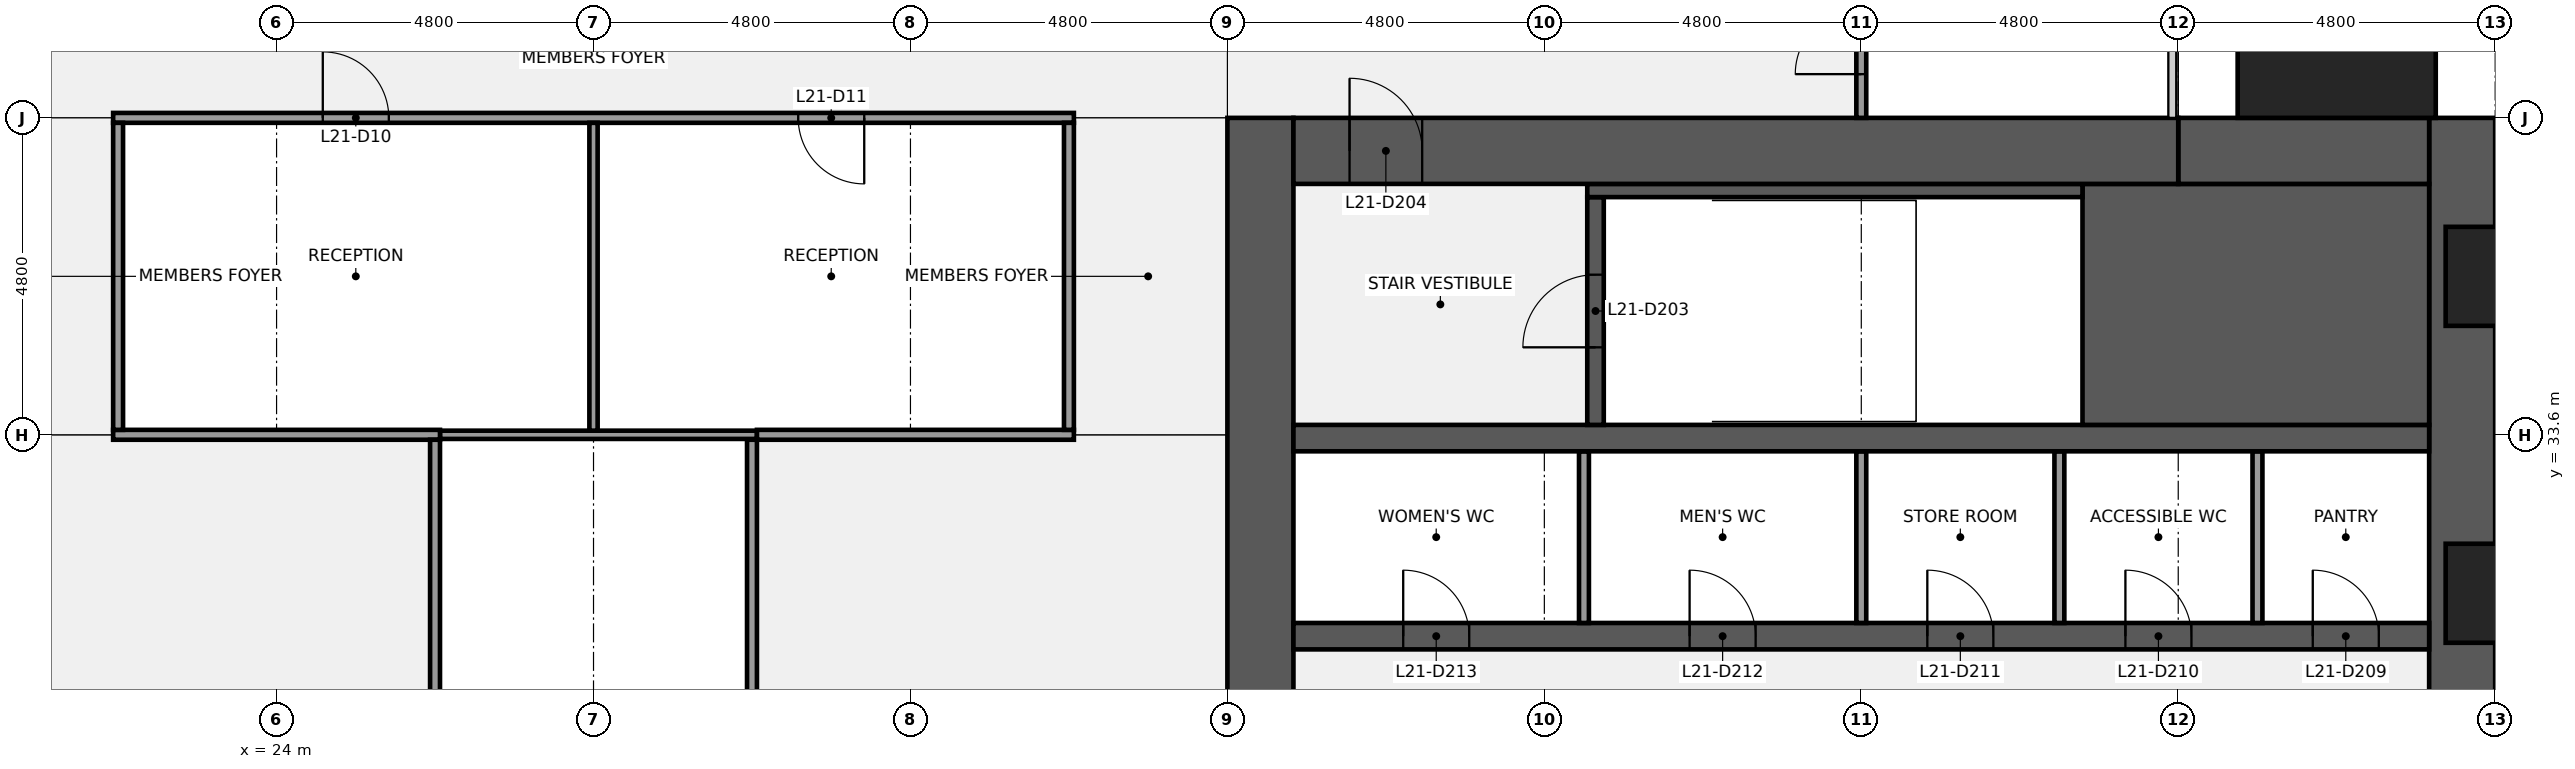
"""IFC4 building model, lengths in metres.
Left out: names, types, materials, properties, quantities, classifications, styles, units other than length and angle.
Written with IfcOpenShell. Run it as: python <this file> out.ifc"""

import sys

from ifc_helpers import new_model, si_unit, direction, frame, frame_2d, origin, origin_2d, place, context, subcontext, project, spatial, rectangle, extrude, element, fill, save


model = new_model("IFC4")
c1 = context("Model", 3, precision=1e-05, world=origin(), true_north=direction((0.0, 1.0)))
c2 = subcontext(c1, "Body", "Model", "MODEL_VIEW")
j1 = project(units=[si_unit("LENGTHUNIT", "METRE"), si_unit("PLANEANGLEUNIT", "RADIAN")], contexts=[c1])
p1 = place(None, origin())
s1 = spatial("IfcSite", under=j1, at=p1, CompositionType="ELEMENT")
p2 = place(p1, origin())
s2 = spatial("IfcBuilding", under=s1, at=p2, CompositionType="ELEMENT")
p3 = place(p2, frame((0.0, 0.0, 104.1)))
s3 = spatial("IfcBuildingStorey", under=s2, at=p3, CompositionType="ELEMENT", Elevation=104.1)
p4 = place(p3, frame((57.1, 38.4, 0.0), z_axis=(0.0, 0.0, 1.0), x_axis=(0.0, -1.0, 0.0)))
e1 = element("IfcWall", 1, at=p4, inside=s3, PredefinedType="SHEAR", context=c2, shape_type="SweptSolid", body=[
    extrude(rectangle(XDim=28.8, YDim=1.0, at=frame_2d((14.4, 0.0))), origin(), (0.0, 0.0, 1.0), 3.84),
])
p5 = place(p4, frame((18.45, 0.0, 0.9)))
e2 = element("IfcOpeningElement", 2, at=p5, cuts=e1, PredefinedType="OPENING", context=c2, shape_type="SweptSolid", body=[
    extrude(rectangle(XDim=1.5, YDim=1.5, at=frame_2d((0.75, 0.75))), frame((0.0, 0.51, 0.0), z_axis=(0.0, -1.0, 0.0), x_axis=(1.0, 0.0, 0.0)), (0.0, 0.0, 1.0), 1.02),
])
p6 = place(p4, frame((8.85, 0.0, 0.9)))
e3 = element("IfcOpeningElement", 3, at=p6, cuts=e1, PredefinedType="OPENING", context=c2, shape_type="SweptSolid", body=[
    extrude(rectangle(XDim=1.5, YDim=1.5, at=frame_2d((0.75, 0.75))), frame((0.0, 0.51, 0.0), z_axis=(0.0, -1.0, 0.0), x_axis=(1.0, 0.0, 0.0)), (0.0, 0.0, 1.0), 1.02),
])
p7 = place(p3, frame((38.9, 9.6, 0.0), z_axis=(0.0, 0.0, 1.0), x_axis=(0.0, 1.0, 0.0)))
e4 = element("IfcWall", 4, at=p7, inside=s3, PredefinedType="SHEAR", context=c2, shape_type="SweptSolid", body=[
    extrude(rectangle(XDim=28.8, YDim=1.0, at=frame_2d((14.4, 0.0))), origin(), (0.0, 0.0, 1.0), 3.84),
])
p8 = place(p7, frame((8.7, 0.0, 0.0)))
e5 = element("IfcOpeningElement", 5, at=p8, cuts=e4, PredefinedType="OPENING", context=c2, shape_type="SweptSolid", body=[
    extrude(rectangle(XDim=1.8, YDim=2.1, at=frame_2d((0.9, 1.05))), frame((0.0, 0.51, 0.0), z_axis=(0.0, -1.0, 0.0), x_axis=(1.0, 0.0, 0.0)), (0.0, 0.0, 1.0), 1.02),
])
p9 = place(p7, frame((18.3, 0.0, 0.0)))
e6 = element("IfcOpeningElement", 6, at=p9, cuts=e4, PredefinedType="OPENING", context=c2, shape_type="SweptSolid", body=[
    extrude(rectangle(XDim=1.8, YDim=2.1, at=frame_2d((0.9, 1.05))), frame((0.0, 0.51, 0.0), z_axis=(0.0, -1.0, 0.0), x_axis=(1.0, 0.0, 0.0)), (0.0, 0.0, 1.0), 1.02),
])
p10 = place(p3, frame((39.4, 30.55, 0.0), z_axis=(0.0, 0.0, 1.0), x_axis=(1.0, 0.0, 0.0)))
e7 = element("IfcWall", 7, at=p10, inside=s3, PredefinedType="SHEAR", context=c2, shape_type="SweptSolid", body=[
    extrude(rectangle(XDim=17.2, YDim=0.4, at=frame_2d((8.6, 0.0))), origin(), (0.0, 0.0, 1.0), 3.84),
])
p11 = place(p10, frame((15.438, 0.0, 0.0)))
e8 = element("IfcOpeningElement", 8, at=p11, cuts=e7, PredefinedType="OPENING", context=c2, shape_type="SweptSolid", body=[
    extrude(rectangle(XDim=1.0, YDim=2.1, at=frame_2d((0.5, 1.05))), frame((0.0, 0.21, 0.0), z_axis=(0.0, -1.0, 0.0), x_axis=(1.0, 0.0, 0.0)), (0.0, 0.0, 1.0), 0.42),
])
p12 = place(p10, frame((12.6, 0.0, 0.0)))
e9 = element("IfcOpeningElement", 9, at=p12, cuts=e7, PredefinedType="OPENING", context=c2, shape_type="SweptSolid", body=[
    extrude(rectangle(XDim=1.0, YDim=2.1, at=frame_2d((0.5, 1.05))), frame((0.0, 0.21, 0.0), z_axis=(0.0, -1.0, 0.0), x_axis=(1.0, 0.0, 0.0)), (0.0, 0.0, 1.0), 0.42),
])
p13 = place(p10, frame((9.6, 0.0, 0.0)))
e10 = element("IfcOpeningElement", 10, at=p13, cuts=e7, PredefinedType="OPENING", context=c2, shape_type="SweptSolid", body=[
    extrude(rectangle(XDim=1.0, YDim=2.1, at=frame_2d((0.5, 1.05))), frame((0.0, 0.21, 0.0), z_axis=(0.0, -1.0, 0.0), x_axis=(1.0, 0.0, 0.0)), (0.0, 0.0, 1.0), 0.42),
])
p14 = place(p10, frame((6.0, 0.0, 0.0)))
e11 = element("IfcOpeningElement", 11, at=p14, cuts=e7, PredefinedType="OPENING", context=c2, shape_type="SweptSolid", body=[
    extrude(rectangle(XDim=1.0, YDim=2.1, at=frame_2d((0.5, 1.05))), frame((0.0, 0.21, 0.0), z_axis=(0.0, -1.0, 0.0), x_axis=(1.0, 0.0, 0.0)), (0.0, 0.0, 1.0), 0.42),
])
p15 = place(p10, frame((1.663, 0.0, 0.0)))
e12 = element("IfcOpeningElement", 12, at=p15, cuts=e7, PredefinedType="OPENING", context=c2, shape_type="SweptSolid", body=[
    extrude(rectangle(XDim=1.0, YDim=2.1, at=frame_2d((0.5, 1.05))), frame((0.0, 0.21, 0.0), z_axis=(0.0, -1.0, 0.0), x_axis=(1.0, 0.0, 0.0)), (0.0, 0.0, 1.0), 0.42),
])
for number, where, z_axis, x_axis in (
    (13, (54.0, 30.75, 0.0), (0.0, 0.0, 1.0), (0.0, 1.0, 0.0)),
    (14, (51.0, 30.75, 0.0), (0.0, 0.0, 1.0), (0.0, 1.0, 0.0)),
    (15, (48.0, 30.75, 0.0), (0.0, 0.0, 1.0), (0.0, 1.0, 0.0)),
    (16, (43.8, 30.75, 0.0), (0.0, 0.0, 1.0), (0.0, 1.0, 0.0)),
):
    element("IfcWall", number, at=place(p3, frame(where, z_axis=z_axis, x_axis=x_axis)), inside=s3, PredefinedType="PARTITIONING", context=c2, shape_type="SweptSolid", body=[
        extrude(rectangle(XDim=2.6, YDim=0.15, at=frame_2d((1.3, 0.0))), origin(), (0.0, 0.0, 1.0), 3.84),
    ])
p16 = place(p3, frame((39.4, 33.55, 0.0), z_axis=(0.0, 0.0, 1.0), x_axis=(1.0, 0.0, 0.0)))
e17 = element("IfcWall", 17, at=p16, inside=s3, PredefinedType="SHEAR", context=c2, shape_type="SweptSolid", body=[
    extrude(rectangle(XDim=17.2, YDim=0.4, at=frame_2d((8.6, 0.0))), origin(), (0.0, 0.0, 1.0), 3.84),
])
p17 = place(p3, frame((51.35, 35.575, 0.0), z_axis=(0.0, 0.0, 1.0), x_axis=(1.0, 0.0, 0.0)))
e18 = element("IfcWall", 18, at=p17, inside=s3, PredefinedType="SHEAR", context=c2, shape_type="SweptSolid", body=[
    extrude(rectangle(XDim=5.25, YDim=3.65, at=frame_2d((2.625, 0.0))), origin(), (0.0, 0.0, 1.0), 3.84),
])
p18 = place(p3, frame((43.975, 33.75, 0.0), z_axis=(0.0, 0.0, 1.0), x_axis=(0.0, 1.0, 0.0)))
e19 = element("IfcWall", 19, at=p18, inside=s3, PredefinedType="SHEAR", context=c2, shape_type="SweptSolid", body=[
    extrude(rectangle(XDim=3.45, YDim=0.25, at=frame_2d((1.725, 0.0))), origin(), (0.0, 0.0, 1.0), 3.84),
])
p19 = place(p18, frame((1.175, 0.0, 0.0)))
e20 = element("IfcOpeningElement", 20, at=p19, cuts=e19, PredefinedType="OPENING", context=c2, shape_type="SweptSolid", body=[
    extrude(rectangle(XDim=1.1, YDim=2.1, at=frame_2d((0.55, 1.05))), frame((0.0, 0.135, 0.0), z_axis=(0.0, -1.0, 0.0), x_axis=(1.0, 0.0, 0.0)), (0.0, 0.0, 1.0), 0.27),
])
p20 = place(p3, frame((43.85, 37.3, 0.0), z_axis=(0.0, 0.0, 1.0), x_axis=(1.0, 0.0, 0.0)))
e21 = element("IfcWall", 21, at=p20, inside=s3, PredefinedType="SHEAR", context=c2, shape_type="SweptSolid", body=[
    extrude(rectangle(XDim=7.5, YDim=0.2, at=frame_2d((3.75, 0.0))), origin(), (0.0, 0.0, 1.0), 3.84),
])
p21 = place(p3, frame((52.8, 37.9, 0.0), z_axis=(0.0, 0.0, 1.0), x_axis=(1.0, 0.0, 0.0)))
e22 = element("IfcWall", 22, at=p21, inside=s3, PredefinedType="SHEAR", context=c2, shape_type="SweptSolid", body=[
    extrude(rectangle(XDim=3.8, YDim=1.0, at=frame_2d((1.9, 0.0))), origin(), (0.0, 0.0, 1.0), 3.84),
])
p22 = place(p3, frame((39.4, 37.9, 0.0), z_axis=(0.0, 0.0, 1.0), x_axis=(1.0, 0.0, 0.0)))
e23 = element("IfcWall", 23, at=p22, inside=s3, PredefinedType="SHEAR", context=c2, shape_type="SweptSolid", body=[
    extrude(rectangle(XDim=13.4, YDim=1.0, at=frame_2d((6.7, 0.0))), origin(), (0.0, 0.0, 1.0), 3.84),
])
p23 = place(p22, frame((0.85, 0.0, 0.0)))
e24 = element("IfcOpeningElement", 24, at=p23, cuts=e23, PredefinedType="OPENING", context=c2, shape_type="SweptSolid", body=[
    extrude(rectangle(XDim=1.1, YDim=2.1, at=frame_2d((0.55, 1.05))), frame((0.0, 0.51, 0.0), z_axis=(0.0, -1.0, 0.0), x_axis=(1.0, 0.0, 0.0)), (0.0, 0.0, 1.0), 1.02),
])
p24 = place(p3, frame((26.475, 33.6, 0.0), z_axis=(0.0, 0.0, 1.0), x_axis=(1.0, 0.0, 0.0)))
e25 = element("IfcWall", 25, at=p24, inside=s3, PredefinedType="PARTITIONING", context=c2, shape_type="SweptSolid", body=[
    extrude(rectangle(XDim=4.8, YDim=0.125, at=frame_2d((2.4, 0.0))), origin(), (0.0, 0.0, 1.0), 2.936),
])
p25 = place(p3, frame((21.525, 33.6, 0.0), z_axis=(0.0, 0.0, 1.0), x_axis=(1.0, 0.0, 0.0)))
e26 = element("IfcWall", 26, at=p25, inside=s3, PredefinedType="PARTITIONING", context=c2, shape_type="SweptSolid", body=[
    extrude(rectangle(XDim=4.95, YDim=0.15, at=frame_2d((2.475, 0.0))), origin(), (0.0, 0.0, 1.0), 2.936),
])
p26 = place(p3, frame((31.275, 33.6, 0.0), z_axis=(0.0, 0.0, 1.0), x_axis=(1.0, 0.0, 0.0)))
e27 = element("IfcWall", 27, at=p26, inside=s3, PredefinedType="PARTITIONING", context=c2, shape_type="SweptSolid", body=[
    extrude(rectangle(XDim=4.8, YDim=0.15, at=frame_2d((2.4, 0.0))), origin(), (0.0, 0.0, 1.0), 2.936),
])
p27 = place(p3, frame((21.525, 38.4, 0.0), z_axis=(0.0, 0.0, 1.0), x_axis=(1.0, 0.0, 0.0)))
e28 = element("IfcWall", 28, at=p27, inside=s3, PredefinedType="PARTITIONING", context=c2, shape_type="SweptSolid", body=[
    extrude(rectangle(XDim=14.55, YDim=0.15, at=frame_2d((7.275, 0.0))), origin(), (0.0, 0.0, 1.0), 2.936),
])
p28 = place(p27, frame((3.175, 0.0, 0.0)))
e29 = element("IfcOpeningElement", 29, at=p28, cuts=e28, PredefinedType="OPENING", context=c2, shape_type="SweptSolid", body=[
    extrude(rectangle(XDim=1.0, YDim=2.1, at=frame_2d((0.5, 1.05))), frame((0.0, 0.085, 0.0), z_axis=(0.0, -1.0, 0.0), x_axis=(1.0, 0.0, 0.0)), (0.0, 0.0, 1.0), 0.17),
])
p29 = place(p27, frame((10.375, 0.0, 0.0)))
e30 = element("IfcOpeningElement", 30, at=p29, cuts=e28, PredefinedType="OPENING", context=c2, shape_type="SweptSolid", body=[
    extrude(rectangle(XDim=1.0, YDim=2.1, at=frame_2d((0.5, 1.05))), frame((0.0, 0.085, 0.0), z_axis=(0.0, -1.0, 0.0), x_axis=(1.0, 0.0, 0.0)), (0.0, 0.0, 1.0), 0.17),
])
p30 = place(p3, frame((21.6, 33.675, 0.0), z_axis=(0.0, 0.0, 1.0), x_axis=(0.0, 1.0, 0.0)))
e31 = element("IfcWall", 31, at=p30, inside=s3, PredefinedType="PARTITIONING", context=c2, shape_type="SweptSolid", body=[
    extrude(rectangle(XDim=4.65, YDim=0.15, at=frame_2d((2.325, 0.0))), origin(), (0.0, 0.0, 1.0), 2.936),
])
p31 = place(p3, frame((26.4, 20.475, 0.0), z_axis=(0.0, 0.0, 1.0), x_axis=(0.0, 1.0, 0.0)))
e32 = element("IfcWall", 32, at=p31, inside=s3, PredefinedType="PARTITIONING", context=c2, shape_type="SweptSolid", body=[
    extrude(rectangle(XDim=13.05, YDim=0.15, at=frame_2d((6.525, 0.0))), origin(), (0.0, 0.0, 1.0), 2.936),
])
p32 = place(p31, frame((6.025, 0.0, 0.0)))
e33 = element("IfcOpeningElement", 33, at=p32, cuts=e32, PredefinedType="OPENING", context=c2, shape_type="SweptSolid", body=[
    extrude(rectangle(XDim=1.0, YDim=2.1, at=frame_2d((0.5, 1.05))), frame((0.0, 0.085, 0.0), z_axis=(0.0, -1.0, 0.0), x_axis=(1.0, 0.0, 0.0)), (0.0, 0.0, 1.0), 0.17),
])
p33 = place(p3, frame((28.8, 33.663, 0.0), z_axis=(0.0, 0.0, 1.0), x_axis=(0.0, 1.0, 0.0)))
e34 = element("IfcWall", 34, at=p33, inside=s3, PredefinedType="PARTITIONING", context=c2, shape_type="SweptSolid", body=[
    extrude(rectangle(XDim=4.662, YDim=0.125, at=frame_2d((2.331, 0.0))), origin(), (0.0, 0.0, 1.0), 2.936),
])
p34 = place(p3, frame((31.2, 20.475, 0.0), z_axis=(0.0, 0.0, 1.0), x_axis=(0.0, 1.0, 0.0)))
e35 = element("IfcWall", 35, at=p34, inside=s3, PredefinedType="PARTITIONING", context=c2, shape_type="SweptSolid", body=[
    extrude(rectangle(XDim=13.05, YDim=0.15, at=frame_2d((6.525, 0.0))), origin(), (0.0, 0.0, 1.0), 2.936),
])
p35 = place(p3, frame((36.0, 33.675, 0.0), z_axis=(0.0, 0.0, 1.0), x_axis=(0.0, 1.0, 0.0)))
e36 = element("IfcWall", 36, at=p35, inside=s3, PredefinedType="PARTITIONING", context=c2, shape_type="SweptSolid", body=[
    extrude(rectangle(XDim=4.65, YDim=0.15, at=frame_2d((2.325, 0.0))), origin(), (0.0, 0.0, 1.0), 2.936),
])
p36 = place(p3, frame((48.0, 38.4, 0.0), z_axis=(0.0, 0.0, 1.0), x_axis=(0.0, 1.0, 0.0)))
e37 = element("IfcWall", 37, at=p36, inside=s3, PredefinedType="PARTITIONING", context=c2, shape_type="SweptSolid", body=[
    extrude(rectangle(XDim=2.325, YDim=0.15, at=frame_2d((1.163, 0.0))), origin(), (0.0, 0.0, 1.0), 2.936),
])
p37 = place(p36, frame((0.663, 0.0, 0.0)))
e38 = element("IfcOpeningElement", 38, at=p37, cuts=e37, PredefinedType="OPENING", context=c2, shape_type="SweptSolid", body=[
    extrude(rectangle(XDim=1.0, YDim=2.1, at=frame_2d((0.5, 1.05))), frame((0.0, 0.085, 0.0), z_axis=(0.0, -1.0, 0.0), x_axis=(1.0, 0.0, 0.0)), (0.0, 0.0, 1.0), 0.17),
])
p38 = place(p3, frame((55.2, 39.15, 0.0), z_axis=(0.0, 0.0, 1.0), x_axis=(1.0, 0.0, 0.0)))
e39 = element("IfcColumn", 39, at=p38, inside=s3, PredefinedType="PILASTER", context=c2, shape_type="SweptSolid", body=[
    extrude(rectangle(XDim=3.0, YDim=1.5, at=origin_2d()), origin(), (0.0, 0.0, 1.0), 4.0),
])
p39 = place(p19, origin())
e40 = element("IfcDoor", 40, at=p39, inside=s3, OperationType="SINGLE_SWING_LEFT", PredefinedType="DOOR", context=c2, shape_type="SweptSolid", body=[
    extrude(rectangle(XDim=1.1, YDim=2.1, at=frame_2d((0.55, 1.05))), frame((0.0, 0.025, 0.0), z_axis=(0.0, -1.0, 0.0), x_axis=(1.0, 0.0, 0.0)), (0.0, 0.0, 1.0), 0.05),
])
fill(e20, e40)
p40 = place(p23, origin())
e41 = element("IfcDoor", 41, at=p40, inside=s3, OperationType="SINGLE_SWING_LEFT", PredefinedType="DOOR", context=c2, shape_type="SweptSolid", body=[
    extrude(rectangle(XDim=1.1, YDim=2.1, at=frame_2d((0.55, 1.05))), frame((0.0, 0.025, 0.0), z_axis=(0.0, -1.0, 0.0), x_axis=(1.0, 0.0, 0.0)), (0.0, 0.0, 1.0), 0.05),
])
fill(e24, e41)
p41 = place(p11, origin())
e42 = element("IfcDoor", 42, at=p41, inside=s3, OperationType="SINGLE_SWING_LEFT", PredefinedType="DOOR", context=c2, shape_type="SweptSolid", body=[
    extrude(rectangle(XDim=1.0, YDim=2.1, at=frame_2d((0.5, 1.05))), frame((0.0, 0.025, 0.0), z_axis=(0.0, -1.0, 0.0), x_axis=(1.0, 0.0, 0.0)), (0.0, 0.0, 1.0), 0.05),
])
fill(e8, e42)
p42 = place(p12, origin())
e43 = element("IfcDoor", 43, at=p42, inside=s3, OperationType="SINGLE_SWING_LEFT", PredefinedType="DOOR", context=c2, shape_type="SweptSolid", body=[
    extrude(rectangle(XDim=1.0, YDim=2.1, at=frame_2d((0.5, 1.05))), frame((0.0, 0.025, 0.0), z_axis=(0.0, -1.0, 0.0), x_axis=(1.0, 0.0, 0.0)), (0.0, 0.0, 1.0), 0.05),
])
fill(e9, e43)
p43 = place(p13, origin())
e44 = element("IfcDoor", 44, at=p43, inside=s3, OperationType="SINGLE_SWING_LEFT", PredefinedType="DOOR", context=c2, shape_type="SweptSolid", body=[
    extrude(rectangle(XDim=1.0, YDim=2.1, at=frame_2d((0.5, 1.05))), frame((0.0, 0.025, 0.0), z_axis=(0.0, -1.0, 0.0), x_axis=(1.0, 0.0, 0.0)), (0.0, 0.0, 1.0), 0.05),
])
fill(e10, e44)
p44 = place(p14, origin())
e45 = element("IfcDoor", 45, at=p44, inside=s3, OperationType="SINGLE_SWING_LEFT", PredefinedType="DOOR", context=c2, shape_type="SweptSolid", body=[
    extrude(rectangle(XDim=1.0, YDim=2.1, at=frame_2d((0.5, 1.05))), frame((0.0, 0.025, 0.0), z_axis=(0.0, -1.0, 0.0), x_axis=(1.0, 0.0, 0.0)), (0.0, 0.0, 1.0), 0.05),
])
fill(e11, e45)
p45 = place(p15, origin())
e46 = element("IfcDoor", 46, at=p45, inside=s3, OperationType="SINGLE_SWING_LEFT", PredefinedType="DOOR", context=c2, shape_type="SweptSolid", body=[
    extrude(rectangle(XDim=1.0, YDim=2.1, at=frame_2d((0.5, 1.05))), frame((0.0, 0.025, 0.0), z_axis=(0.0, -1.0, 0.0), x_axis=(1.0, 0.0, 0.0)), (0.0, 0.0, 1.0), 0.05),
])
fill(e12, e46)
p46 = place(p28, origin())
e47 = element("IfcDoor", 47, at=p46, inside=s3, OperationType="SINGLE_SWING_LEFT", PredefinedType="DOOR", context=c2, shape_type="SweptSolid", body=[
    extrude(rectangle(XDim=1.0, YDim=2.1, at=frame_2d((0.5, 1.05))), frame((0.0, 0.025, 0.0), z_axis=(0.0, -1.0, 0.0), x_axis=(1.0, 0.0, 0.0)), (0.0, 0.0, 1.0), 0.05),
])
fill(e29, e47)
p47 = place(p29, origin())
e48 = element("IfcDoor", 48, at=p47, inside=s3, OperationType="SINGLE_SWING_RIGHT", PredefinedType="DOOR", context=c2, shape_type="SweptSolid", body=[
    extrude(rectangle(XDim=1.0, YDim=2.1, at=frame_2d((0.5, 1.05))), frame((0.0, 0.025, 0.0), z_axis=(0.0, -1.0, 0.0), x_axis=(1.0, 0.0, 0.0)), (0.0, 0.0, 1.0), 0.05),
])
fill(e30, e48)
p48 = place(p37, origin())
e49 = element("IfcDoor", 49, at=p48, inside=s3, OperationType="SINGLE_SWING_LEFT", PredefinedType="DOOR", context=c2, shape_type="SweptSolid", body=[
    extrude(rectangle(XDim=1.0, YDim=2.1, at=frame_2d((0.5, 1.05))), frame((0.0, 0.025, 0.0), z_axis=(0.0, -1.0, 0.0), x_axis=(1.0, 0.0, 0.0)), (0.0, 0.0, 1.0), 0.05),
])
fill(e38, e49)
save(model, sys.argv[1])
